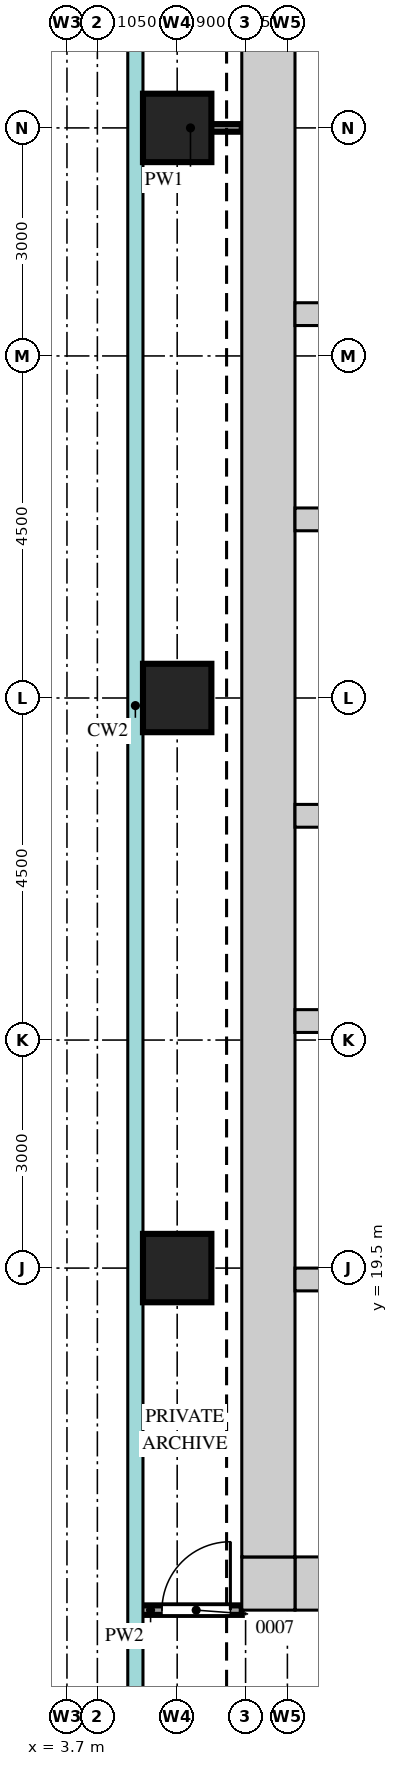
"""IFC4 building model, lengths in metres.
Left out: names, types, materials, properties, quantities, classifications, styles, units other than length and angle.
Written with IfcOpenShell. Run it as: python <this file> out.ifc"""

import sys

from ifc_helpers import new_model, si_unit, direction, frame, frame_2d, origin, origin_2d, place, context, subcontext, project, spatial, rectangle, extrude, source, transform, mapped, element, fill, save


model = new_model("IFC4")
c1 = context("Model", 3, precision=1e-05, world=origin(), true_north=direction((0.0, 1.0)))
c2 = subcontext(c1, "Body", "Model", "MODEL_VIEW")
j1 = project(units=[si_unit("LENGTHUNIT", "METRE"), si_unit("PLANEANGLEUNIT", "RADIAN")], contexts=[c1])
p1 = place(None, origin())
s1 = spatial("IfcSite", under=j1, at=p1, CompositionType="ELEMENT")
p2 = place(p1, origin())
s2 = spatial("IfcBuilding", under=s1, at=p2, CompositionType="ELEMENT")
p3 = place(p2, frame((0.0, 0.0, 270.2)))
s3 = spatial("IfcBuildingStorey", under=s2, at=p3, CompositionType="ELEMENT", Elevation=270.2)
m1 = source(origin(), c2, "Body", "SweptSolid", [
    extrude(rectangle(XDim=13.6, YDim=0.7, at=frame_2d((6.8, 0.0))), origin(), (0.0, 0.0, 1.0), 3.75),
])
p4 = place(p3, frame((6.7, 15.35, 0.0), z_axis=(0.0, 0.0, 1.0), x_axis=(1.0, 0.0, 0.0)))
e1 = element("IfcWall", 1, at=p4, inside=s3, PredefinedType="SHEAR", context=c2, shape_type="MappedRepresentation", body=[
    mapped(m1, transform((0.0, 0.0, 0.0))),
])
m2 = source(origin(), c2, "Body", "SweptSolid", [
    extrude(rectangle(XDim=1.2, YDim=2.1, at=frame_2d((0.6, 1.05))), frame((0.0, 0.36, 0.0), z_axis=(0.0, -1.0, 0.0), x_axis=(1.0, 0.0, 0.0)), (0.0, 0.0, 1.0), 0.72),
])
p5 = place(p4, frame((5.5, 0.0, 0.0)))
e2 = element("IfcOpeningElement", 2, at=p5, cuts=e1, PredefinedType="OPENING", context=c2, shape_type="MappedRepresentation", body=[
    mapped(m2, transform((0.0, 0.0, 0.0))),
])
p6 = place(p4, frame((2.15, 0.0, 0.0)))
e3 = element("IfcOpeningElement", 3, at=p6, cuts=e1, PredefinedType="OPENING", context=c2, shape_type="MappedRepresentation", body=[
    mapped(m2, transform((0.0, 0.0, 0.0))),
])
m3 = source(origin(), c2, "Body", "SweptSolid", [
    extrude(rectangle(XDim=1.0, YDim=2.1, at=frame_2d((0.5, 1.05))), frame((0.0, 0.36, 0.0), z_axis=(0.0, -1.0, 0.0), x_axis=(1.0, 0.0, 0.0)), (0.0, 0.0, 1.0), 0.72),
])
p7 = place(p4, frame((8.0, 0.0, 0.0)))
e4 = element("IfcOpeningElement", 4, at=p7, cuts=e1, PredefinedType="OPENING", context=c2, shape_type="MappedRepresentation", body=[
    mapped(m3, transform((0.0, 0.0, 0.0))),
])
m4 = source(origin(), c2, "Body", "SweptSolid", [
    extrude(rectangle(XDim=0.7, YDim=0.7, at=frame_2d((0.35, 0.0))), origin(), (0.0, 0.0, 1.0), 3.75),
])
p8 = place(p3, frame((6.0, 15.35, 0.0), z_axis=(0.0, 0.0, 1.0), x_axis=(1.0, 0.0, 0.0)))
e5 = element("IfcWall", 5, at=p8, inside=s3, PredefinedType="SHEAR", context=c2, shape_type="MappedRepresentation", body=[
    mapped(m4, transform((0.0, 0.0, 0.0))),
])
m5 = source(origin(), c2, "Body", "SweptSolid", [
    extrude(rectangle(XDim=22.6, YDim=0.7, at=frame_2d((11.3, 0.0))), origin(), (0.0, 0.0, 1.0), 3.75),
])
p9 = place(p3, frame((6.35, 15.7, 0.0), z_axis=(0.0, 0.0, 1.0), x_axis=(0.0, 1.0, 0.0)))
e6 = element("IfcWall", 6, at=p9, inside=s3, PredefinedType="SHEAR", context=c2, shape_type="MappedRepresentation", body=[
    mapped(m5, transform((0.0, 0.0, 0.0))),
])
m6 = source(origin(), c2, "Body", "SweptSolid", [
    extrude(rectangle(XDim=13.6, YDim=0.3, at=frame_2d((6.8, 0.0))), origin(), (0.0, 0.0, 1.0), 3.75),
])
p10 = place(p3, frame((6.7, 22.75, 0.0), z_axis=(0.0, 0.0, 1.0), x_axis=(1.0, 0.0, 0.0)))
e7 = element("IfcWall", 7, at=p10, inside=s3, PredefinedType="STANDARD", context=c2, shape_type="MappedRepresentation", body=[
    mapped(m6, transform((0.0, 0.0, 0.0))),
])
m7 = source(origin(), c2, "Body", "SweptSolid", [
    extrude(rectangle(XDim=9.375, YDim=0.3, at=frame_2d((4.688, 0.0))), origin(), (0.0, 0.0, 1.0), 3.75),
])
p11 = place(p3, frame((6.7, 19.35, 0.0), z_axis=(0.0, 0.0, 1.0), x_axis=(1.0, 0.0, 0.0)))
e8 = element("IfcWall", 8, at=p11, inside=s3, PredefinedType="STANDARD", context=c2, shape_type="MappedRepresentation", body=[
    mapped(m7, transform((0.0, 0.0, 0.0))),
])
m8 = source(origin(), c2, "Body", "SweptSolid", [
    extrude(rectangle(XDim=1.2, YDim=2.1, at=frame_2d((0.6, 1.05))), frame((0.0, 0.16, 0.0), z_axis=(0.0, -1.0, 0.0), x_axis=(1.0, 0.0, 0.0)), (0.0, 0.0, 1.0), 0.32),
])
p12 = place(p11, frame((0.95, 0.0, 0.0)))
e9 = element("IfcOpeningElement", 9, at=p12, cuts=e8, PredefinedType="OPENING", context=c2, shape_type="MappedRepresentation", body=[
    mapped(m8, transform((0.0, 0.0, 0.0))),
])
p13 = place(p11, frame((3.3, 0.0, 0.0)))
e10 = element("IfcOpeningElement", 10, at=p13, cuts=e8, PredefinedType="OPENING", context=c2, shape_type="MappedRepresentation", body=[
    mapped(m8, transform((0.0, 0.0, 0.0))),
])
p14 = place(p11, frame((5.55, 0.0, 0.0)))
e11 = element("IfcOpeningElement", 11, at=p14, cuts=e8, PredefinedType="OPENING", context=c2, shape_type="MappedRepresentation", body=[
    mapped(m8, transform((0.0, 0.0, 0.0))),
])
p15 = place(p11, frame((7.7, 0.0, 0.0)))
e12 = element("IfcOpeningElement", 12, at=p15, cuts=e8, PredefinedType="OPENING", context=c2, shape_type="MappedRepresentation", body=[
    mapped(m8, transform((0.0, 0.0, 0.0))),
])
m9 = source(origin(), c2, "Body", "SweptSolid", [
    extrude(rectangle(XDim=8.15, YDim=0.3, at=frame_2d((4.075, 0.0))), origin(), (0.0, 0.0, 1.0), 3.75),
])
p16 = place(p3, frame((6.7, 32.05, 0.0), z_axis=(0.0, 0.0, 1.0), x_axis=(1.0, 0.0, 0.0)))
e13 = element("IfcWall", 13, at=p16, inside=s3, PredefinedType="STANDARD", context=c2, shape_type="MappedRepresentation", body=[
    mapped(m9, transform((0.0, 0.0, 0.0))),
])
p17 = place(p3, frame((6.7, 29.35, 0.0), z_axis=(0.0, 0.0, 1.0), x_axis=(1.0, 0.0, 0.0)))
e14 = element("IfcWall", 14, at=p17, inside=s3, PredefinedType="STANDARD", context=c2, shape_type="MappedRepresentation", body=[
    mapped(m9, transform((0.0, 0.0, 0.0))),
])
p18 = place(p17, frame((1.05, 0.0, 0.0)))
e15 = element("IfcOpeningElement", 15, at=p18, cuts=e14, PredefinedType="OPENING", context=c2, shape_type="MappedRepresentation", body=[
    mapped(m8, transform((0.0, 0.0, 0.0))),
])
p19 = place(p17, frame((3.6, 0.0, 0.0)))
e16 = element("IfcOpeningElement", 16, at=p19, cuts=e14, PredefinedType="OPENING", context=c2, shape_type="MappedRepresentation", body=[
    mapped(m8, transform((0.0, 0.0, 0.0))),
])
p20 = place(p17, frame((6.15, 0.0, 0.0)))
e17 = element("IfcOpeningElement", 17, at=p20, cuts=e14, PredefinedType="OPENING", context=c2, shape_type="MappedRepresentation", body=[
    mapped(m8, transform((0.0, 0.0, 0.0))),
])
p21 = place(p3, frame((6.7, 25.45, 0.0), z_axis=(0.0, 0.0, 1.0), x_axis=(1.0, 0.0, 0.0)))
e18 = element("IfcWall", 18, at=p21, inside=s3, PredefinedType="STANDARD", context=c2, shape_type="MappedRepresentation", body=[
    mapped(m9, transform((0.0, 0.0, 0.0))),
])
p22 = place(p21, frame((1.05, 0.0, 0.0)))
e19 = element("IfcOpeningElement", 19, at=p22, cuts=e18, PredefinedType="OPENING", context=c2, shape_type="MappedRepresentation", body=[
    mapped(m8, transform((0.0, 0.0, 0.0))),
])
p23 = place(p21, frame((3.6, 0.0, 0.0)))
e20 = element("IfcOpeningElement", 20, at=p23, cuts=e18, PredefinedType="OPENING", context=c2, shape_type="MappedRepresentation", body=[
    mapped(m8, transform((0.0, 0.0, 0.0))),
])
p24 = place(p21, frame((6.15, 0.0, 0.0)))
e21 = element("IfcOpeningElement", 21, at=p24, cuts=e18, PredefinedType="OPENING", context=c2, shape_type="MappedRepresentation", body=[
    mapped(m8, transform((0.0, 0.0, 0.0))),
])
m10 = source(origin(), c2, "Body", "SweptSolid", [
    extrude(rectangle(XDim=0.9, YDim=0.9, at=origin_2d()), origin(), (0.0, 0.0, 1.0), 4.0),
])
for number, where, z_axis, x_axis in (
    (22, (5.15, 19.5, 0.0), (0.0, 0.0, 1.0), (1.0, 0.0, 0.0)),
    (23, (5.15, 27.0, 0.0), (0.0, 0.0, 1.0), (1.0, 0.0, 0.0)),
    (24, (5.15, 34.5, 0.0), (0.0, 0.0, 1.0), (1.0, 0.0, 0.0)),
):
    element("IfcColumn", number, at=place(p3, frame(where, z_axis=z_axis, x_axis=x_axis)), inside=s3, PredefinedType="COLUMN", context=c2, shape_type="MappedRepresentation", body=[
        mapped(m10, transform((0.0, 0.0, 0.0))),
    ])
m11 = source(origin(), c2, "Body", "SweptSolid", [
    extrude(rectangle(XDim=1.35, YDim=0.125, at=frame_2d((0.675, 0.0))), origin(), (0.0, 0.0, 1.0), 3.8),
])
p25 = place(p3, frame((4.65, 15.0, 0.0), z_axis=(0.0, 0.0, 1.0), x_axis=(1.0, 0.0, 0.0)))
e25 = element("IfcWall", 25, at=p25, inside=s3, PredefinedType="PARTITIONING", context=c2, shape_type="MappedRepresentation", body=[
    mapped(m11, transform((0.0, 0.0, 0.0))),
])
m12 = source(origin(), c2, "Body", "SweptSolid", [
    extrude(rectangle(XDim=0.9, YDim=2.1, at=frame_2d((0.45, 1.05))), frame((0.0, 0.073, 0.0), z_axis=(0.0, -1.0, 0.0), x_axis=(1.0, 0.0, 0.0)), (0.0, 0.0, 1.0), 0.145),
])
p26 = place(p25, frame((0.3, 0.0, 0.0)))
e26 = element("IfcOpeningElement", 26, at=p26, cuts=e25, PredefinedType="OPENING", context=c2, shape_type="MappedRepresentation", body=[
    mapped(m12, transform((0.0, 0.0, 0.0))),
])
m13 = source(origin(), c2, "Body", "SweptSolid", [
    extrude(rectangle(XDim=1.35, YDim=0.1, at=frame_2d((0.675, 0.0))), origin(), (0.0, 0.0, 1.0), 3.8),
])
p27 = place(p3, frame((4.65, 34.5, 0.0), z_axis=(0.0, 0.0, 1.0), x_axis=(1.0, 0.0, 0.0)))
e27 = element("IfcWall", 27, at=p27, inside=s3, PredefinedType="PARTITIONING", context=c2, shape_type="MappedRepresentation", body=[
    mapped(m13, transform((0.0, 0.0, 0.0))),
])
m14 = source(origin(), c2, "Body", "SweptSolid", [
    extrude(rectangle(XDim=0.9, YDim=2.1, at=frame_2d((0.45, 1.05))), frame((0.0, 0.025, 0.0), z_axis=(0.0, -1.0, 0.0), x_axis=(1.0, 0.0, 0.0)), (0.0, 0.0, 1.0), 0.05),
])
p28 = place(p26, origin())
e28 = element("IfcDoor", 28, at=p28, inside=s3, OperationType="SINGLE_SWING_LEFT", PredefinedType="DOOR", context=c2, shape_type="MappedRepresentation", body=[
    mapped(m14, transform((0.0, 0.0, 0.0))),
])
fill(e26, e28)
save(model, sys.argv[1])
